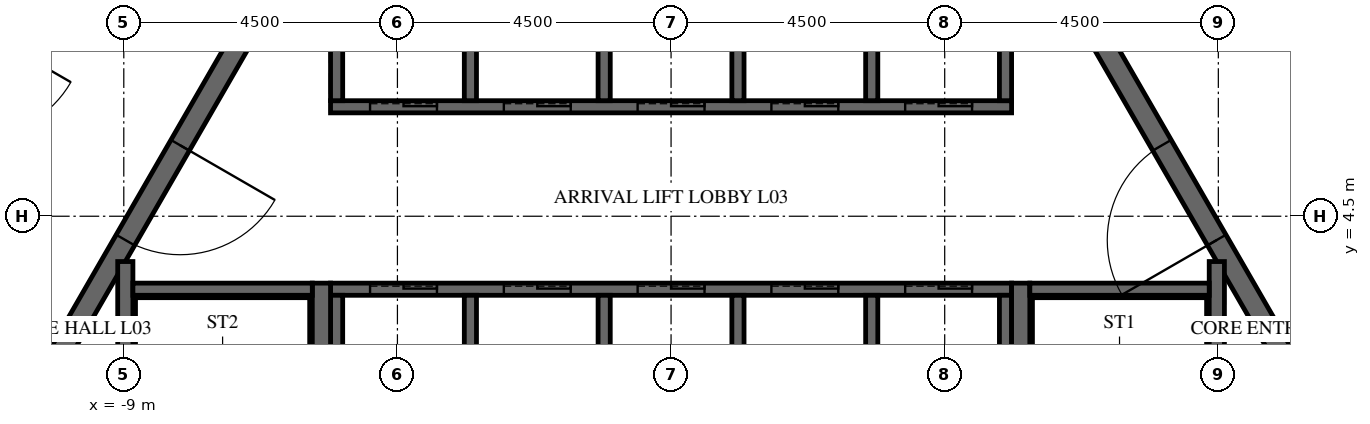
"""IFC4 building model, lengths in metres.
Left out: names, types, materials, properties, quantities, classifications, styles, units other than length and angle.
Written with IfcOpenShell. Run it as: python <this file> out.ifc"""

import sys

from ifc_helpers import new_model, si_unit, direction, frame, frame_2d, origin, place, context, subcontext, project, spatial, polyline, rectangle, outline, extrude, element, fill, save


model = new_model("IFC4")
c1 = context("Model", 3, precision=1e-05, world=origin(), true_north=direction((0.0, 1.0)))
c2 = subcontext(c1, "Body", "Model", "MODEL_VIEW")
j1 = project(units=[si_unit("LENGTHUNIT", "METRE"), si_unit("PLANEANGLEUNIT", "RADIAN")], contexts=[c1])
p1 = place(None, origin())
s1 = spatial("IfcSite", under=j1, at=p1, CompositionType="ELEMENT")
p2 = place(p1, origin())
s2 = spatial("IfcBuilding", under=s1, at=p2, CompositionType="ELEMENT")
p3 = place(p2, frame((0.0, 0.0, 20.5)))
s3 = spatial("IfcBuildingStorey", under=s2, at=p3, CompositionType="ELEMENT", Elevation=20.5)
p4 = place(p3, frame((-7.91, 13.7, -0.25), z_axis=(0.0, 0.0, 1.0), x_axis=(-0.499999880136, -0.866025472988, 0.0)))
e1 = element("IfcWall", 1, at=p4, inside=s3, PredefinedType="SHEAR", context=c2, shape_type="SweptSolid", body=[
    extrude(outline(polyline([(-0.173, -0.3), (15.993, -0.3), (15.646, 0.3), (0.173, 0.3), (-0.173, -0.3)])), origin(), (0.0, 0.0, 1.0), 5.5),
])
p5 = place(p4, frame((7.039, 0.0, 0.25)))
e2 = element("IfcOpeningElement", 2, at=p5, cuts=e1, PredefinedType="OPENING", context=c2, shape_type="SweptSolid", body=[
    extrude(rectangle(XDim=1.8, YDim=2.4, at=frame_2d((0.9, 1.2))), frame((0.0, 0.31, 0.0), z_axis=(0.0, -1.0, 0.0), x_axis=(1.0, 0.0, 0.0)), (0.0, 0.0, 1.0), 0.62),
])
p6 = place(p3, frame((15.819, 0.0, -0.25), z_axis=(0.0, 0.0, 1.0), x_axis=(-0.499999880136, 0.866025472988, 0.0)))
e3 = element("IfcWall", 3, at=p6, inside=s3, PredefinedType="SHEAR", context=c2, shape_type="SweptSolid", body=[
    extrude(outline(polyline([(-0.173, -0.3), (15.993, -0.3), (15.646, 0.3), (0.173, 0.3), (-0.173, -0.3)])), origin(), (0.0, 0.0, 1.0), 5.5),
])
p7 = place(p6, frame((6.981, 0.0, 0.25)))
e4 = element("IfcOpeningElement", 4, at=p7, cuts=e3, PredefinedType="OPENING", context=c2, shape_type="SweptSolid", body=[
    extrude(rectangle(XDim=1.8, YDim=2.4, at=frame_2d((0.9, 1.2))), frame((0.0, 0.31, 0.0), z_axis=(0.0, -1.0, 0.0), x_axis=(1.0, 0.0, 0.0)), (0.0, 0.0, 1.0), 0.62),
])
p8 = place(p3, frame((-5.673, 9.825, -0.25), z_axis=(0.0, 0.0, 1.0), x_axis=(-0.499995046907, -0.866028263435, 0.0)))
e5 = element("IfcWall", 5, at=p8, inside=s3, PredefinedType="SHEAR", context=c2, shape_type="SweptSolid", body=[
    extrude(outline(polyline([(-0.101, -0.175), (11.446, -0.175), (11.244, 0.175), (0.101, 0.175), (-0.101, -0.175)])), origin(), (0.0, 0.0, 1.0), 5.5),
])
p9 = place(p8, frame((4.801, 0.0, 0.25)))
e6 = element("IfcOpeningElement", 6, at=p9, cuts=e5, PredefinedType="OPENING", context=c2, shape_type="SweptSolid", body=[
    extrude(rectangle(XDim=1.8, YDim=2.4, at=frame_2d((0.9, 1.2))), frame((0.0, 0.185, 0.0), z_axis=(0.0, -1.0, 0.0), x_axis=(1.0, 0.0, 0.0)), (0.0, 0.0, 1.0), 0.37),
])
p10 = place(p3, frame((11.345, 0.0, -0.25), z_axis=(0.0, 0.0, 1.0), x_axis=(-0.499995046907, 0.866028263435, 0.0)))
e7 = element("IfcWall", 7, at=p10, inside=s3, PredefinedType="SHEAR", context=c2, shape_type="SweptSolid", body=[
    extrude(outline(polyline([(-0.101, -0.175), (11.446, -0.175), (11.244, 0.175), (0.101, 0.175), (-0.101, -0.175)])), origin(), (0.0, 0.0, 1.0), 5.5),
])
p11 = place(p10, frame((4.744, 0.0, 0.25)))
e8 = element("IfcOpeningElement", 8, at=p11, cuts=e7, PredefinedType="OPENING", context=c2, shape_type="SweptSolid", body=[
    extrude(rectangle(XDim=1.8, YDim=2.4, at=frame_2d((0.9, 1.2))), frame((0.0, 0.185, 0.0), z_axis=(0.0, -1.0, 0.0), x_axis=(1.0, 0.0, 0.0)), (0.0, 0.0, 1.0), 0.37),
])
p12 = place(p3, frame((-5.6, 6.3, -0.25), z_axis=(0.0, 0.0, 1.0), x_axis=(1.0, 0.0, 0.0)))
e9 = element("IfcWall", 9, at=p12, inside=s3, PredefinedType="SHEAR", context=c2, shape_type="SweptSolid", body=[
    extrude(rectangle(XDim=11.2, YDim=0.2, at=frame_2d((5.6, 0.0))), origin(), (0.0, 0.0, 1.0), 5.5),
])
p13 = place(p12, frame((0.65, 0.0, 0.25)))
e10 = element("IfcOpeningElement", 10, at=p13, cuts=e9, PredefinedType="OPENING", context=c2, shape_type="SweptSolid", body=[
    extrude(rectangle(XDim=1.1, YDim=2.1, at=frame_2d((0.55, 1.05))), frame((0.0, 0.11, 0.0), z_axis=(0.0, -1.0, 0.0), x_axis=(1.0, 0.0, 0.0)), (0.0, 0.0, 1.0), 0.22),
])
p14 = place(p12, frame((2.85, 0.0, 0.25)))
e11 = element("IfcOpeningElement", 11, at=p14, cuts=e9, PredefinedType="OPENING", context=c2, shape_type="SweptSolid", body=[
    extrude(rectangle(XDim=1.1, YDim=2.1, at=frame_2d((0.55, 1.05))), frame((0.0, 0.11, 0.0), z_axis=(0.0, -1.0, 0.0), x_axis=(1.0, 0.0, 0.0)), (0.0, 0.0, 1.0), 0.22),
])
p15 = place(p12, frame((5.05, 0.0, 0.25)))
e12 = element("IfcOpeningElement", 12, at=p15, cuts=e9, PredefinedType="OPENING", context=c2, shape_type="SweptSolid", body=[
    extrude(rectangle(XDim=1.1, YDim=2.1, at=frame_2d((0.55, 1.05))), frame((0.0, 0.11, 0.0), z_axis=(0.0, -1.0, 0.0), x_axis=(1.0, 0.0, 0.0)), (0.0, 0.0, 1.0), 0.22),
])
p16 = place(p12, frame((7.25, 0.0, 0.25)))
e13 = element("IfcOpeningElement", 13, at=p16, cuts=e9, PredefinedType="OPENING", context=c2, shape_type="SweptSolid", body=[
    extrude(rectangle(XDim=1.1, YDim=2.1, at=frame_2d((0.55, 1.05))), frame((0.0, 0.11, 0.0), z_axis=(0.0, -1.0, 0.0), x_axis=(1.0, 0.0, 0.0)), (0.0, 0.0, 1.0), 0.22),
])
p17 = place(p12, frame((9.45, 0.0, 0.25)))
e14 = element("IfcOpeningElement", 14, at=p17, cuts=e9, PredefinedType="OPENING", context=c2, shape_type="SweptSolid", body=[
    extrude(rectangle(XDim=1.1, YDim=2.1, at=frame_2d((0.55, 1.05))), frame((0.0, 0.11, 0.0), z_axis=(0.0, -1.0, 0.0), x_axis=(1.0, 0.0, 0.0)), (0.0, 0.0, 1.0), 0.22),
])
for number, where, z_axis, x_axis in (
    (15, (-5.5, 6.4, -0.25), (0.0, 0.0, 1.0), (0.0, 1.0, 0.0)),
    (16, (-3.3, 6.4, -0.25), (0.0, 0.0, 1.0), (0.0, 1.0, 0.0)),
    (17, (-1.1, 6.4, -0.25), (0.0, 0.0, 1.0), (0.0, 1.0, 0.0)),
    (18, (1.1, 6.4, -0.25), (0.0, 0.0, 1.0), (0.0, 1.0, 0.0)),
    (19, (3.3, 6.4, -0.25), (0.0, 0.0, 1.0), (0.0, 1.0, 0.0)),
    (20, (5.5, 6.4, -0.25), (0.0, 0.0, 1.0), (0.0, 1.0, 0.0)),
):
    element("IfcWall", number, at=place(p3, frame(where, z_axis=z_axis, x_axis=x_axis)), inside=s3, PredefinedType="SHEAR", context=c2, shape_type="SweptSolid", body=[
        extrude(rectangle(XDim=2.9, YDim=0.2, at=frame_2d((1.45, 0.0))), origin(), (0.0, 0.0, 1.0), 5.5),
    ])
p18 = place(p3, frame((-5.6, 3.3, -0.25), z_axis=(0.0, 0.0, 1.0), x_axis=(1.0, 0.0, 0.0)))
e21 = element("IfcWall", 21, at=p18, inside=s3, PredefinedType="SHEAR", context=c2, shape_type="SweptSolid", body=[
    extrude(rectangle(XDim=11.2, YDim=0.2, at=frame_2d((5.6, 0.0))), origin(), (0.0, 0.0, 1.0), 5.5),
])
p19 = place(p18, frame((0.65, 0.0, 0.25)))
e22 = element("IfcOpeningElement", 22, at=p19, cuts=e21, PredefinedType="OPENING", context=c2, shape_type="SweptSolid", body=[
    extrude(rectangle(XDim=1.1, YDim=2.1, at=frame_2d((0.55, 1.05))), frame((0.0, 0.11, 0.0), z_axis=(0.0, -1.0, 0.0), x_axis=(1.0, 0.0, 0.0)), (0.0, 0.0, 1.0), 0.22),
])
p20 = place(p18, frame((2.85, 0.0, 0.25)))
e23 = element("IfcOpeningElement", 23, at=p20, cuts=e21, PredefinedType="OPENING", context=c2, shape_type="SweptSolid", body=[
    extrude(rectangle(XDim=1.1, YDim=2.1, at=frame_2d((0.55, 1.05))), frame((0.0, 0.11, 0.0), z_axis=(0.0, -1.0, 0.0), x_axis=(1.0, 0.0, 0.0)), (0.0, 0.0, 1.0), 0.22),
])
p21 = place(p18, frame((5.05, 0.0, 0.25)))
e24 = element("IfcOpeningElement", 24, at=p21, cuts=e21, PredefinedType="OPENING", context=c2, shape_type="SweptSolid", body=[
    extrude(rectangle(XDim=1.1, YDim=2.1, at=frame_2d((0.55, 1.05))), frame((0.0, 0.11, 0.0), z_axis=(0.0, -1.0, 0.0), x_axis=(1.0, 0.0, 0.0)), (0.0, 0.0, 1.0), 0.22),
])
p22 = place(p18, frame((7.25, 0.0, 0.25)))
e25 = element("IfcOpeningElement", 25, at=p22, cuts=e21, PredefinedType="OPENING", context=c2, shape_type="SweptSolid", body=[
    extrude(rectangle(XDim=1.1, YDim=2.1, at=frame_2d((0.55, 1.05))), frame((0.0, 0.11, 0.0), z_axis=(0.0, -1.0, 0.0), x_axis=(1.0, 0.0, 0.0)), (0.0, 0.0, 1.0), 0.22),
])
p23 = place(p18, frame((9.45, 0.0, 0.25)))
e26 = element("IfcOpeningElement", 26, at=p23, cuts=e21, PredefinedType="OPENING", context=c2, shape_type="SweptSolid", body=[
    extrude(rectangle(XDim=1.1, YDim=2.1, at=frame_2d((0.55, 1.05))), frame((0.0, 0.11, 0.0), z_axis=(0.0, -1.0, 0.0), x_axis=(1.0, 0.0, 0.0)), (0.0, 0.0, 1.0), 0.22),
])
for number, where, z_axis, x_axis in (
    (27, (-5.5, 0.1, -0.25), (0.0, 0.0, 1.0), (0.0, 1.0, 0.0)),
    (28, (-3.3, 0.1, -0.25), (0.0, 0.0, 1.0), (0.0, 1.0, 0.0)),
    (29, (-1.1, 0.1, -0.25), (0.0, 0.0, 1.0), (0.0, 1.0, 0.0)),
    (30, (1.1, 0.1, -0.25), (0.0, 0.0, 1.0), (0.0, 1.0, 0.0)),
    (31, (3.3, 0.1, -0.25), (0.0, 0.0, 1.0), (0.0, 1.0, 0.0)),
    (32, (5.5, 0.1, -0.25), (0.0, 0.0, 1.0), (0.0, 1.0, 0.0)),
):
    element("IfcWall", number, at=place(p3, frame(where, z_axis=z_axis, x_axis=x_axis)), inside=s3, PredefinedType="SHEAR", context=c2, shape_type="SweptSolid", body=[
        extrude(rectangle(XDim=3.1, YDim=0.2, at=frame_2d((1.55, 0.0))), origin(), (0.0, 0.0, 1.0), 5.5),
    ])
p24 = place(p3, frame((5.75, -3.4, -0.25), z_axis=(0.0, 0.0, 1.0), x_axis=(0.0, 1.0, 0.0)))
e33 = element("IfcWall", 33, at=p24, inside=s3, PredefinedType="SHEAR", context=c2, shape_type="SweptSolid", body=[
    extrude(rectangle(XDim=6.8, YDim=0.3, at=frame_2d((3.4, 0.0))), origin(), (0.0, 0.0, 1.0), 5.5),
])
p25 = place(p3, frame((8.975, -3.755, -0.25), z_axis=(0.0, 0.0, 1.0), x_axis=(0.0, 1.0, 0.0)))
e34 = element("IfcWall", 34, at=p25, inside=s3, PredefinedType="SHEAR", context=c2, shape_type="SweptSolid", body=[
    extrude(rectangle(XDim=7.51, YDim=0.25, at=frame_2d((3.755, 0.0))), origin(), (0.0, 0.0, 1.0), 5.5),
])
p26 = place(p3, frame((5.9, 3.3, -0.25), z_axis=(0.0, 0.0, 1.0), x_axis=(1.0, 0.0, 0.0)))
e35 = element("IfcWall", 35, at=p26, inside=s3, PredefinedType="SHEAR", context=c2, shape_type="SweptSolid", body=[
    extrude(rectangle(XDim=2.95, YDim=0.2, at=frame_2d((1.475, 0.0))), origin(), (0.0, 0.0, 1.0), 5.5),
])
p27 = place(p3, frame((-5.75, -3.4, -0.25), z_axis=(0.0, 0.0, 1.0), x_axis=(0.0, 1.0, 0.0)))
e36 = element("IfcWall", 36, at=p27, inside=s3, PredefinedType="SHEAR", context=c2, shape_type="SweptSolid", body=[
    extrude(rectangle(XDim=6.8, YDim=0.3, at=frame_2d((3.4, 0.0))), origin(), (0.0, 0.0, 1.0), 5.5),
])
p28 = place(p3, frame((-8.975, -3.755, -0.25), z_axis=(0.0, 0.0, 1.0), x_axis=(0.0, 1.0, 0.0)))
e37 = element("IfcWall", 37, at=p28, inside=s3, PredefinedType="SHEAR", context=c2, shape_type="SweptSolid", body=[
    extrude(rectangle(XDim=7.51, YDim=0.25, at=frame_2d((3.755, 0.0))), origin(), (0.0, 0.0, 1.0), 5.5),
])
p29 = place(p3, frame((-8.85, 3.3, -0.25), z_axis=(0.0, 0.0, 1.0), x_axis=(1.0, 0.0, 0.0)))
e38 = element("IfcWall", 38, at=p29, inside=s3, PredefinedType="SHEAR", context=c2, shape_type="SweptSolid", body=[
    extrude(rectangle(XDim=2.95, YDim=0.2, at=frame_2d((1.475, 0.0))), origin(), (0.0, 0.0, 1.0), 5.5),
])
p30 = place(p9, origin())
e39 = element("IfcDoor", 39, at=p30, inside=s3, OperationType="DOUBLE_DOOR_SINGLE_SWING", PredefinedType="DOOR", context=c2, shape_type="SweptSolid", body=[
    extrude(rectangle(XDim=1.8, YDim=2.4, at=frame_2d((0.9, 1.2))), frame((0.0, 0.025, 0.0), z_axis=(0.0, -1.0, 0.0), x_axis=(1.0, 0.0, 0.0)), (0.0, 0.0, 1.0), 0.05),
])
fill(e6, e39)
p31 = place(p11, origin())
e40 = element("IfcDoor", 40, at=p31, inside=s3, OperationType="DOUBLE_DOOR_SINGLE_SWING", PredefinedType="DOOR", context=c2, shape_type="SweptSolid", body=[
    extrude(rectangle(XDim=1.8, YDim=2.4, at=frame_2d((0.9, 1.2))), frame((0.0, 0.025, 0.0), z_axis=(0.0, -1.0, 0.0), x_axis=(1.0, 0.0, 0.0)), (0.0, 0.0, 1.0), 0.05),
])
fill(e8, e40)
p32 = place(p13, origin())
e41 = element("IfcDoor", 41, at=p32, inside=s3, OperationType="SLIDING_TO_LEFT", PredefinedType="DOOR", context=c2, shape_type="SweptSolid", body=[
    extrude(rectangle(XDim=1.1, YDim=2.1, at=frame_2d((0.55, 1.05))), frame((0.0, 0.025, 0.0), z_axis=(0.0, -1.0, 0.0), x_axis=(1.0, 0.0, 0.0)), (0.0, 0.0, 1.0), 0.05),
])
fill(e10, e41)
p33 = place(p14, origin())
e42 = element("IfcDoor", 42, at=p33, inside=s3, OperationType="SLIDING_TO_LEFT", PredefinedType="DOOR", context=c2, shape_type="SweptSolid", body=[
    extrude(rectangle(XDim=1.1, YDim=2.1, at=frame_2d((0.55, 1.05))), frame((0.0, 0.025, 0.0), z_axis=(0.0, -1.0, 0.0), x_axis=(1.0, 0.0, 0.0)), (0.0, 0.0, 1.0), 0.05),
])
fill(e11, e42)
p34 = place(p15, origin())
e43 = element("IfcDoor", 43, at=p34, inside=s3, OperationType="SLIDING_TO_LEFT", PredefinedType="DOOR", context=c2, shape_type="SweptSolid", body=[
    extrude(rectangle(XDim=1.1, YDim=2.1, at=frame_2d((0.55, 1.05))), frame((0.0, 0.025, 0.0), z_axis=(0.0, -1.0, 0.0), x_axis=(1.0, 0.0, 0.0)), (0.0, 0.0, 1.0), 0.05),
])
fill(e12, e43)
p35 = place(p16, origin())
e44 = element("IfcDoor", 44, at=p35, inside=s3, OperationType="SLIDING_TO_LEFT", PredefinedType="DOOR", context=c2, shape_type="SweptSolid", body=[
    extrude(rectangle(XDim=1.1, YDim=2.1, at=frame_2d((0.55, 1.05))), frame((0.0, 0.025, 0.0), z_axis=(0.0, -1.0, 0.0), x_axis=(1.0, 0.0, 0.0)), (0.0, 0.0, 1.0), 0.05),
])
fill(e13, e44)
p36 = place(p17, origin())
e45 = element("IfcDoor", 45, at=p36, inside=s3, OperationType="SLIDING_TO_LEFT", PredefinedType="DOOR", context=c2, shape_type="SweptSolid", body=[
    extrude(rectangle(XDim=1.1, YDim=2.1, at=frame_2d((0.55, 1.05))), frame((0.0, 0.025, 0.0), z_axis=(0.0, -1.0, 0.0), x_axis=(1.0, 0.0, 0.0)), (0.0, 0.0, 1.0), 0.05),
])
fill(e14, e45)
p37 = place(p19, origin())
e46 = element("IfcDoor", 46, at=p37, inside=s3, OperationType="SLIDING_TO_LEFT", PredefinedType="DOOR", context=c2, shape_type="SweptSolid", body=[
    extrude(rectangle(XDim=1.1, YDim=2.1, at=frame_2d((0.55, 1.05))), frame((0.0, 0.025, 0.0), z_axis=(0.0, -1.0, 0.0), x_axis=(1.0, 0.0, 0.0)), (0.0, 0.0, 1.0), 0.05),
])
fill(e22, e46)
p38 = place(p20, origin())
e47 = element("IfcDoor", 47, at=p38, inside=s3, OperationType="SLIDING_TO_LEFT", PredefinedType="DOOR", context=c2, shape_type="SweptSolid", body=[
    extrude(rectangle(XDim=1.1, YDim=2.1, at=frame_2d((0.55, 1.05))), frame((0.0, 0.025, 0.0), z_axis=(0.0, -1.0, 0.0), x_axis=(1.0, 0.0, 0.0)), (0.0, 0.0, 1.0), 0.05),
])
fill(e23, e47)
p39 = place(p21, origin())
e48 = element("IfcDoor", 48, at=p39, inside=s3, OperationType="SLIDING_TO_LEFT", PredefinedType="DOOR", context=c2, shape_type="SweptSolid", body=[
    extrude(rectangle(XDim=1.1, YDim=2.1, at=frame_2d((0.55, 1.05))), frame((0.0, 0.025, 0.0), z_axis=(0.0, -1.0, 0.0), x_axis=(1.0, 0.0, 0.0)), (0.0, 0.0, 1.0), 0.05),
])
fill(e24, e48)
p40 = place(p22, origin())
e49 = element("IfcDoor", 49, at=p40, inside=s3, OperationType="SLIDING_TO_LEFT", PredefinedType="DOOR", context=c2, shape_type="SweptSolid", body=[
    extrude(rectangle(XDim=1.1, YDim=2.1, at=frame_2d((0.55, 1.05))), frame((0.0, 0.025, 0.0), z_axis=(0.0, -1.0, 0.0), x_axis=(1.0, 0.0, 0.0)), (0.0, 0.0, 1.0), 0.05),
])
fill(e25, e49)
p41 = place(p23, origin())
e50 = element("IfcDoor", 50, at=p41, inside=s3, OperationType="SLIDING_TO_LEFT", PredefinedType="DOOR", context=c2, shape_type="SweptSolid", body=[
    extrude(rectangle(XDim=1.1, YDim=2.1, at=frame_2d((0.55, 1.05))), frame((0.0, 0.025, 0.0), z_axis=(0.0, -1.0, 0.0), x_axis=(1.0, 0.0, 0.0)), (0.0, 0.0, 1.0), 0.05),
])
fill(e26, e50)
save(model, sys.argv[1])
